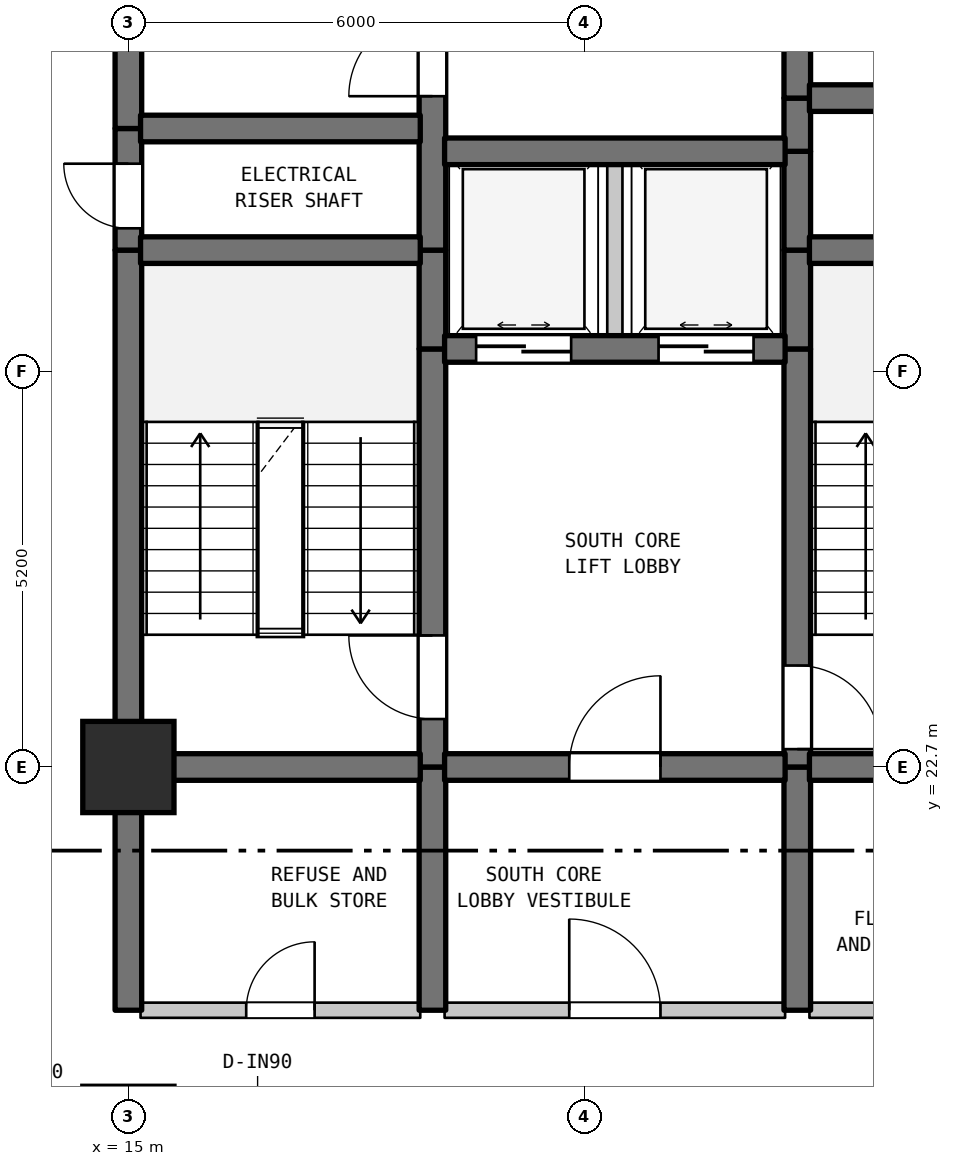
"""IFC4 building model, lengths in metres.
Left out: names, types, materials, properties, quantities, classifications, styles, units other than length and angle.
Written with IfcOpenShell. Run it as: python <this file> out.ifc"""

import sys

from ifc_helpers import new_model, si_unit, direction, frame, frame_2d, origin, origin_2d, place, context, subcontext, project, spatial, rectangle, extrude, element, fill, save


model = new_model("IFC4")
c1 = context("Model", 3, precision=1e-05, world=origin(), true_north=direction((0.0, 1.0)))
c2 = subcontext(c1, "Body", "Model", "MODEL_VIEW")
j1 = project(units=[si_unit("LENGTHUNIT", "METRE"), si_unit("PLANEANGLEUNIT", "RADIAN")], contexts=[c1])
p1 = place(None, origin())
s1 = spatial("IfcSite", under=j1, at=p1, CompositionType="ELEMENT")
p2 = place(p1, origin())
s2 = spatial("IfcBuilding", under=s1, at=p2, CompositionType="ELEMENT")
p3 = place(p2, frame((0.0, 0.0, 53.6)))
s3 = spatial("IfcBuildingStorey", under=s2, at=p3, CompositionType="ELEMENT", Elevation=53.6)
p4 = place(p3, frame((15.0, 22.7, 0.0), z_axis=(0.0, 0.0, 1.0), x_axis=(1.0, 0.0, 0.0)))
e1 = element("IfcColumn", 1, at=p4, inside=s3, PredefinedType="COLUMN", context=c2, shape_type="SweptSolid", body=[
    extrude(rectangle(XDim=1.2, YDim=1.2, at=origin_2d()), origin(), (0.0, 0.0, 1.0), 3.7),
])
p5 = place(p3, frame((15.0, 19.5, 0.0), z_axis=(0.0, 0.0, 1.0), x_axis=(0.0, 1.0, 0.0)))
e2 = element("IfcWall", 2, at=p5, inside=s3, PredefinedType="SHEAR", context=c2, shape_type="SweptSolid", body=[
    extrude(rectangle(XDim=3.2, YDim=0.35, at=frame_2d((1.6, 0.0))), origin(), (0.0, 0.0, 1.0), 3.385),
])
p6 = place(p3, frame((15.0, 22.7, 0.0), z_axis=(0.0, 0.0, 1.0), x_axis=(0.0, 1.0, 0.0)))
e3 = element("IfcWall", 3, at=p6, inside=s3, PredefinedType="SHEAR", context=c2, shape_type="SweptSolid", body=[
    extrude(rectangle(XDim=6.8, YDim=0.35, at=frame_2d((3.4, 0.0))), origin(), (0.0, 0.0, 1.0), 3.385),
])
p7 = place(p3, frame((15.0, 29.5, 0.0), z_axis=(0.0, 0.0, 1.0), x_axis=(0.0, 1.0, 0.0)))
e4 = element("IfcWall", 4, at=p7, inside=s3, PredefinedType="SHEAR", context=c2, shape_type="SweptSolid", body=[
    extrude(rectangle(XDim=1.6, YDim=0.35, at=frame_2d((0.8, 0.0))), origin(), (0.0, 0.0, 1.0), 3.385),
])
p8 = place(p7, frame((0.287, 0.0, 0.0)))
e5 = element("IfcOpeningElement", 5, at=p8, cuts=e4, PredefinedType="OPENING", context=c2, shape_type="SweptSolid", body=[
    extrude(rectangle(XDim=0.85, YDim=2.1, at=frame_2d((0.425, 1.05))), frame((0.0, 0.185, 0.0), z_axis=(0.0, -1.0, 0.0), x_axis=(1.0, 0.0, 0.0)), (0.0, 0.0, 1.0), 0.37),
])
p9 = place(p3, frame((15.0, 31.1, 0.0), z_axis=(0.0, 0.0, 1.0), x_axis=(0.0, 1.0, 0.0)))
e6 = element("IfcWall", 6, at=p9, inside=s3, PredefinedType="SHEAR", context=c2, shape_type="SweptSolid", body=[
    extrude(rectangle(XDim=6.8, YDim=0.35, at=frame_2d((3.4, 0.0))), origin(), (0.0, 0.0, 1.0), 3.385),
])
p10 = place(p3, frame((19.0, 19.5, 0.0), z_axis=(0.0, 0.0, 1.0), x_axis=(0.0, 1.0, 0.0)))
e7 = element("IfcWall", 7, at=p10, inside=s3, PredefinedType="SHEAR", context=c2, shape_type="SweptSolid", body=[
    extrude(rectangle(XDim=3.2, YDim=0.35, at=frame_2d((1.6, 0.0))), origin(), (0.0, 0.0, 1.0), 3.385),
])
p11 = place(p3, frame((19.0, 22.7, 0.0), z_axis=(0.0, 0.0, 1.0), x_axis=(0.0, 1.0, 0.0)))
e8 = element("IfcWall", 8, at=p11, inside=s3, PredefinedType="SHEAR", context=c2, shape_type="SweptSolid", body=[
    extrude(rectangle(XDim=5.5, YDim=0.35, at=frame_2d((2.75, 0.0))), origin(), (0.0, 0.0, 1.0), 3.385),
])
p12 = place(p11, frame((0.631, 0.0, 0.0)))
e9 = element("IfcOpeningElement", 9, at=p12, cuts=e8, PredefinedType="OPENING", context=c2, shape_type="SweptSolid", body=[
    extrude(rectangle(XDim=1.1, YDim=2.15, at=frame_2d((0.55, 1.075))), frame((0.0, 0.185, 0.0), z_axis=(0.0, -1.0, 0.0), x_axis=(1.0, 0.0, 0.0)), (0.0, 0.0, 1.0), 0.37),
])
p13 = place(p3, frame((19.0, 28.2, 0.0), z_axis=(0.0, 0.0, 1.0), x_axis=(0.0, 1.0, 0.0)))
e10 = element("IfcWall", 10, at=p13, inside=s3, PredefinedType="SHEAR", context=c2, shape_type="SweptSolid", body=[
    extrude(rectangle(XDim=1.3, YDim=0.35, at=frame_2d((0.65, 0.0))), origin(), (0.0, 0.0, 1.0), 3.385),
])
p14 = place(p3, frame((19.0, 29.5, 0.0), z_axis=(0.0, 0.0, 1.0), x_axis=(0.0, 1.0, 0.0)))
e11 = element("IfcWall", 11, at=p14, inside=s3, PredefinedType="SHEAR", context=c2, shape_type="SweptSolid", body=[
    extrude(rectangle(XDim=5.5, YDim=0.35, at=frame_2d((2.75, 0.0))), origin(), (0.0, 0.0, 1.0), 3.385),
])
p15 = place(p14, frame((2.025, 0.0, 0.0)))
e12 = element("IfcOpeningElement", 12, at=p15, cuts=e11, PredefinedType="OPENING", context=c2, shape_type="SweptSolid", body=[
    extrude(rectangle(XDim=1.1, YDim=2.15, at=frame_2d((0.55, 1.075))), frame((0.0, 0.185, 0.0), z_axis=(0.0, -1.0, 0.0), x_axis=(1.0, 0.0, 0.0)), (0.0, 0.0, 1.0), 0.37),
])
p16 = place(p3, frame((21.4, 28.2, 0.0), z_axis=(0.0, 0.0, 1.0), x_axis=(0.0, 1.0, 0.0)))
e13 = element("IfcWall", 13, at=p16, inside=s3, PredefinedType="STANDARD", context=c2, shape_type="SweptSolid", body=[
    extrude(rectangle(XDim=2.6, YDim=0.2, at=frame_2d((1.3, 0.0))), origin(), (0.0, 0.0, 1.0), 3.385),
])
p17 = place(p3, frame((23.8, 19.5, 0.0), z_axis=(0.0, 0.0, 1.0), x_axis=(0.0, 1.0, 0.0)))
e14 = element("IfcWall", 14, at=p17, inside=s3, PredefinedType="SHEAR", context=c2, shape_type="SweptSolid", body=[
    extrude(rectangle(XDim=3.2, YDim=0.35, at=frame_2d((1.6, 0.0))), origin(), (0.0, 0.0, 1.0), 3.385),
])
p18 = place(p3, frame((23.8, 22.7, 0.0), z_axis=(0.0, 0.0, 1.0), x_axis=(0.0, 1.0, 0.0)))
e15 = element("IfcWall", 15, at=p18, inside=s3, PredefinedType="SHEAR", context=c2, shape_type="SweptSolid", body=[
    extrude(rectangle(XDim=5.5, YDim=0.35, at=frame_2d((2.75, 0.0))), origin(), (0.0, 0.0, 1.0), 3.385),
])
p19 = place(p18, frame((0.235, 0.0, 0.0)))
e16 = element("IfcOpeningElement", 16, at=p19, cuts=e15, PredefinedType="OPENING", context=c2, shape_type="SweptSolid", body=[
    extrude(rectangle(XDim=1.1, YDim=2.15, at=frame_2d((0.55, 1.075))), frame((0.0, 0.185, 0.0), z_axis=(0.0, -1.0, 0.0), x_axis=(1.0, 0.0, 0.0)), (0.0, 0.0, 1.0), 0.37),
])
for number, where, z_axis, x_axis in (
    (17, (23.8, 28.2, 0.0), (0.0, 0.0, 1.0), (0.0, 1.0, 0.0)),
    (18, (23.8, 29.5, 0.0), (0.0, 0.0, 1.0), (0.0, 1.0, 0.0)),
):
    element("IfcWall", number, at=place(p3, frame(where, z_axis=z_axis, x_axis=x_axis)), inside=s3, PredefinedType="SHEAR", context=c2, shape_type="SweptSolid", body=[
        extrude(rectangle(XDim=1.3, YDim=0.35, at=frame_2d((0.65, 0.0))), origin(), (0.0, 0.0, 1.0), 3.385),
    ])
p20 = place(p3, frame((23.8, 30.8, 0.0), z_axis=(0.0, 0.0, 1.0), x_axis=(0.0, 1.0, 0.0)))
e19 = element("IfcWall", 19, at=p20, inside=s3, PredefinedType="SHEAR", context=c2, shape_type="SweptSolid", body=[
    extrude(rectangle(XDim=0.7, YDim=0.35, at=frame_2d((0.35, 0.0))), origin(), (0.0, 0.0, 1.0), 3.385),
])
p21 = place(p3, frame((23.8, 31.5, 0.0), z_axis=(0.0, 0.0, 1.0), x_axis=(0.0, 1.0, 0.0)))
e20 = element("IfcWall", 20, at=p21, inside=s3, PredefinedType="SHEAR", context=c2, shape_type="SweptSolid", body=[
    extrude(rectangle(XDim=3.5, YDim=0.35, at=frame_2d((1.75, 0.0))), origin(), (0.0, 0.0, 1.0), 3.385),
])
p22 = place(p21, frame((1.127, 0.0, 0.0)))
e21 = element("IfcOpeningElement", 21, at=p22, cuts=e20, PredefinedType="OPENING", context=c2, shape_type="SweptSolid", body=[
    extrude(rectangle(XDim=1.1, YDim=2.15, at=frame_2d((0.55, 1.075))), frame((0.0, 0.185, 0.0), z_axis=(0.0, -1.0, 0.0), x_axis=(1.0, 0.0, 0.0)), (0.0, 0.0, 1.0), 0.37),
])
p23 = place(p3, frame((15.16, 19.5, 0.0), z_axis=(0.0, 0.0, 1.0), x_axis=(1.0, 0.0, 0.0)))
e22 = element("IfcWall", 22, at=p23, inside=s3, PredefinedType="STANDARD", context=c2, shape_type="SweptSolid", body=[
    extrude(rectangle(XDim=3.68, YDim=0.2, at=frame_2d((1.84, 0.0))), origin(), (0.0, 0.0, 1.0), 3.385),
])
p24 = place(p23, frame((1.39, 0.0, 0.0)))
e23 = element("IfcOpeningElement", 23, at=p24, cuts=e22, PredefinedType="OPENING", context=c2, shape_type="SweptSolid", body=[
    extrude(rectangle(XDim=0.9, YDim=2.15, at=frame_2d((0.45, 1.075))), frame((0.0, 0.11, 0.0), z_axis=(0.0, -1.0, 0.0), x_axis=(1.0, 0.0, 0.0)), (0.0, 0.0, 1.0), 0.22),
])
p25 = place(p3, frame((19.16, 19.5, 0.0), z_axis=(0.0, 0.0, 1.0), x_axis=(1.0, 0.0, 0.0)))
e24 = element("IfcWall", 24, at=p25, inside=s3, PredefinedType="STANDARD", context=c2, shape_type="SweptSolid", body=[
    extrude(rectangle(XDim=4.48, YDim=0.2, at=frame_2d((2.24, 0.0))), origin(), (0.0, 0.0, 1.0), 3.385),
])
p26 = place(p25, frame((1.64, 0.0, 0.0)))
e25 = element("IfcOpeningElement", 25, at=p26, cuts=e24, PredefinedType="OPENING", context=c2, shape_type="SweptSolid", body=[
    extrude(rectangle(XDim=1.2, YDim=2.2, at=frame_2d((0.6, 1.1))), frame((0.0, 0.11, 0.0), z_axis=(0.0, -1.0, 0.0), x_axis=(1.0, 0.0, 0.0)), (0.0, 0.0, 1.0), 0.22),
])
p27 = place(p3, frame((23.96, 19.5, 0.0), z_axis=(0.0, 0.0, 1.0), x_axis=(1.0, 0.0, 0.0)))
e26 = element("IfcWall", 26, at=p27, inside=s3, PredefinedType="STANDARD", context=c2, shape_type="SweptSolid", body=[
    extrude(rectangle(XDim=3.155, YDim=0.2, at=frame_2d((1.578, 0.0))), origin(), (0.0, 0.0, 1.0), 3.385),
])
p28 = place(p27, frame((0.991, 0.0, 0.0)))
e27 = element("IfcOpeningElement", 27, at=p28, cuts=e26, PredefinedType="OPENING", context=c2, shape_type="SweptSolid", body=[
    extrude(rectangle(XDim=0.95, YDim=2.15, at=frame_2d((0.475, 1.075))), frame((0.0, 0.11, 0.0), z_axis=(0.0, -1.0, 0.0), x_axis=(1.0, 0.0, 0.0)), (0.0, 0.0, 1.0), 0.22),
])
p29 = place(p3, frame((15.16, 22.7, 0.0), z_axis=(0.0, 0.0, 1.0), x_axis=(1.0, 0.0, 0.0)))
e28 = element("IfcWall", 28, at=p29, inside=s3, PredefinedType="SHEAR", context=c2, shape_type="SweptSolid", body=[
    extrude(rectangle(XDim=3.68, YDim=0.35, at=frame_2d((1.84, 0.0))), origin(), (0.0, 0.0, 1.0), 3.385),
])
p30 = place(p3, frame((19.16, 22.7, 0.0), z_axis=(0.0, 0.0, 1.0), x_axis=(1.0, 0.0, 0.0)))
e29 = element("IfcWall", 29, at=p30, inside=s3, PredefinedType="SHEAR", context=c2, shape_type="SweptSolid", body=[
    extrude(rectangle(XDim=4.48, YDim=0.35, at=frame_2d((2.24, 0.0))), origin(), (0.0, 0.0, 1.0), 3.385),
])
p31 = place(p30, frame((1.64, 0.0, 0.0)))
e30 = element("IfcOpeningElement", 30, at=p31, cuts=e29, PredefinedType="OPENING", context=c2, shape_type="SweptSolid", body=[
    extrude(rectangle(XDim=1.2, YDim=2.2, at=frame_2d((0.6, 1.1))), frame((0.0, 0.185, 0.0), z_axis=(0.0, -1.0, 0.0), x_axis=(1.0, 0.0, 0.0)), (0.0, 0.0, 1.0), 0.37),
])
p32 = place(p3, frame((23.96, 22.7, 0.0), z_axis=(0.0, 0.0, 1.0), x_axis=(1.0, 0.0, 0.0)))
e31 = element("IfcWall", 31, at=p32, inside=s3, PredefinedType="SHEAR", context=c2, shape_type="SweptSolid", body=[
    extrude(rectangle(XDim=3.155, YDim=0.35, at=frame_2d((1.578, 0.0))), origin(), (0.0, 0.0, 1.0), 3.385),
])
p33 = place(p3, frame((19.16, 28.2, 0.0), z_axis=(0.0, 0.0, 1.0), x_axis=(1.0, 0.0, 0.0)))
e32 = element("IfcWall", 32, at=p33, inside=s3, PredefinedType="SHEAR", context=c2, shape_type="SweptSolid", body=[
    extrude(rectangle(XDim=4.48, YDim=0.35, at=frame_2d((2.24, 0.0))), origin(), (0.0, 0.0, 1.0), 3.385),
])
p34 = place(p33, frame((0.415, 0.0, 0.0)))
e33 = element("IfcOpeningElement", 33, at=p34, cuts=e32, PredefinedType="OPENING", context=c2, shape_type="SweptSolid", body=[
    extrude(rectangle(XDim=1.25, YDim=2.2, at=frame_2d((0.625, 1.1))), frame((0.0, 0.185, 0.0), z_axis=(0.0, -1.0, 0.0), x_axis=(1.0, 0.0, 0.0)), (0.0, 0.0, 1.0), 0.37),
])
p35 = place(p33, frame((2.815, 0.0, 0.0)))
e34 = element("IfcOpeningElement", 34, at=p35, cuts=e32, PredefinedType="OPENING", context=c2, shape_type="SweptSolid", body=[
    extrude(rectangle(XDim=1.25, YDim=2.2, at=frame_2d((0.625, 1.1))), frame((0.0, 0.185, 0.0), z_axis=(0.0, -1.0, 0.0), x_axis=(1.0, 0.0, 0.0)), (0.0, 0.0, 1.0), 0.37),
])
p36 = place(p3, frame((15.16, 29.5, 0.0), z_axis=(0.0, 0.0, 1.0), x_axis=(1.0, 0.0, 0.0)))
e35 = element("IfcWall", 35, at=p36, inside=s3, PredefinedType="SHEAR", context=c2, shape_type="SweptSolid", body=[
    extrude(rectangle(XDim=3.68, YDim=0.35, at=frame_2d((1.84, 0.0))), origin(), (0.0, 0.0, 1.0), 3.385),
])
p37 = place(p3, frame((23.96, 29.5, 0.0), z_axis=(0.0, 0.0, 1.0), x_axis=(1.0, 0.0, 0.0)))
e36 = element("IfcWall", 36, at=p37, inside=s3, PredefinedType="SHEAR", context=c2, shape_type="SweptSolid", body=[
    extrude(rectangle(XDim=3.18, YDim=0.35, at=frame_2d((1.59, 0.0))), origin(), (0.0, 0.0, 1.0), 3.385),
])
p38 = place(p3, frame((19.16, 30.8, 0.0), z_axis=(0.0, 0.0, 1.0), x_axis=(1.0, 0.0, 0.0)))
e37 = element("IfcWall", 37, at=p38, inside=s3, PredefinedType="SHEAR", context=c2, shape_type="SweptSolid", body=[
    extrude(rectangle(XDim=4.48, YDim=0.35, at=frame_2d((2.24, 0.0))), origin(), (0.0, 0.0, 1.0), 3.385),
])
p39 = place(p3, frame((15.16, 31.1, 0.0), z_axis=(0.0, 0.0, 1.0), x_axis=(1.0, 0.0, 0.0)))
e38 = element("IfcWall", 38, at=p39, inside=s3, PredefinedType="SHEAR", context=c2, shape_type="SweptSolid", body=[
    extrude(rectangle(XDim=3.68, YDim=0.35, at=frame_2d((1.84, 0.0))), origin(), (0.0, 0.0, 1.0), 3.385),
])
p40 = place(p3, frame((23.96, 31.5, 0.0), z_axis=(0.0, 0.0, 1.0), x_axis=(1.0, 0.0, 0.0)))
e39 = element("IfcWall", 39, at=p40, inside=s3, PredefinedType="SHEAR", context=c2, shape_type="SweptSolid", body=[
    extrude(rectangle(XDim=3.18, YDim=0.35, at=frame_2d((1.59, 0.0))), origin(), (0.0, 0.0, 1.0), 3.385),
])
p41 = place(p40, frame((1.094, 0.0, 0.0)))
e40 = element("IfcOpeningElement", 40, at=p41, cuts=e39, PredefinedType="OPENING", context=c2, shape_type="SweptSolid", body=[
    extrude(rectangle(XDim=0.85, YDim=2.1, at=frame_2d((0.425, 1.05))), frame((0.0, 0.185, 0.0), z_axis=(0.0, -1.0, 0.0), x_axis=(1.0, 0.0, 0.0)), (0.0, 0.0, 1.0), 0.37),
])
p42 = place(p8, origin())
e41 = element("IfcDoor", 41, at=p42, inside=s3, OperationType="SINGLE_SWING_RIGHT", PredefinedType="DOOR", context=c2, shape_type="SweptSolid", body=[
    extrude(rectangle(XDim=0.85, YDim=2.1, at=frame_2d((0.425, 1.05))), frame((0.0, 0.025, 0.0), z_axis=(0.0, -1.0, 0.0), x_axis=(1.0, 0.0, 0.0)), (0.0, 0.0, 1.0), 0.05),
])
fill(e5, e41)
p43 = place(p12, origin())
e42 = element("IfcDoor", 42, at=p43, inside=s3, OperationType="SINGLE_SWING_RIGHT", PredefinedType="DOOR", context=c2, shape_type="SweptSolid", body=[
    extrude(rectangle(XDim=1.1, YDim=2.15, at=frame_2d((0.55, 1.075))), frame((0.0, 0.025, 0.0), z_axis=(0.0, -1.0, 0.0), x_axis=(1.0, 0.0, 0.0)), (0.0, 0.0, 1.0), 0.05),
])
fill(e9, e42)
p44 = place(p15, origin())
e43 = element("IfcDoor", 43, at=p44, inside=s3, OperationType="SINGLE_SWING_LEFT", PredefinedType="DOOR", context=c2, shape_type="SweptSolid", body=[
    extrude(rectangle(XDim=1.1, YDim=2.15, at=frame_2d((0.55, 1.075))), frame((0.0, 0.025, 0.0), z_axis=(0.0, -1.0, 0.0), x_axis=(1.0, 0.0, 0.0)), (0.0, 0.0, 1.0), 0.05),
])
fill(e12, e43)
p45 = place(p19, frame((1.1, 0.0, 0.0), z_axis=(0.0, 0.0, 1.0), x_axis=(-1.0, 0.0, 0.0)))
e44 = element("IfcDoor", 44, at=p45, inside=s3, OperationType="SINGLE_SWING_LEFT", PredefinedType="DOOR", context=c2, shape_type="SweptSolid", body=[
    extrude(rectangle(XDim=1.1, YDim=2.15, at=frame_2d((0.55, 1.075))), frame((0.0, 0.025, 0.0), z_axis=(0.0, -1.0, 0.0), x_axis=(1.0, 0.0, 0.0)), (0.0, 0.0, 1.0), 0.05),
])
fill(e16, e44)
p46 = place(p24, origin())
e45 = element("IfcDoor", 45, at=p46, inside=s3, OperationType="SINGLE_SWING_RIGHT", PredefinedType="DOOR", context=c2, shape_type="SweptSolid", body=[
    extrude(rectangle(XDim=0.9, YDim=2.15, at=frame_2d((0.45, 1.075))), frame((0.0, 0.025, 0.0), z_axis=(0.0, -1.0, 0.0), x_axis=(1.0, 0.0, 0.0)), (0.0, 0.0, 1.0), 0.05),
])
fill(e23, e45)
p47 = place(p26, origin())
e46 = element("IfcDoor", 46, at=p47, inside=s3, OperationType="SINGLE_SWING_LEFT", PredefinedType="DOOR", context=c2, shape_type="SweptSolid", body=[
    extrude(rectangle(XDim=1.2, YDim=2.2, at=frame_2d((0.6, 1.1))), frame((0.0, 0.025, 0.0), z_axis=(0.0, -1.0, 0.0), x_axis=(1.0, 0.0, 0.0)), (0.0, 0.0, 1.0), 0.05),
])
fill(e25, e46)
p48 = place(p31, origin())
e47 = element("IfcDoor", 47, at=p48, inside=s3, OperationType="SINGLE_SWING_RIGHT", PredefinedType="DOOR", context=c2, shape_type="SweptSolid", body=[
    extrude(rectangle(XDim=1.2, YDim=2.2, at=frame_2d((0.6, 1.1))), frame((0.0, 0.025, 0.0), z_axis=(0.0, -1.0, 0.0), x_axis=(1.0, 0.0, 0.0)), (0.0, 0.0, 1.0), 0.05),
])
fill(e30, e47)
p49 = place(p34, origin())
e48 = element("IfcDoor", 48, at=p49, inside=s3, OperationType="DOUBLE_DOOR_SLIDING", PredefinedType="DOOR", context=c2, shape_type="SweptSolid", body=[
    extrude(rectangle(XDim=1.25, YDim=2.2, at=frame_2d((0.625, 1.1))), frame((0.0, 0.025, 0.0), z_axis=(0.0, -1.0, 0.0), x_axis=(1.0, 0.0, 0.0)), (0.0, 0.0, 1.0), 0.05),
])
fill(e33, e48)
p50 = place(p35, origin())
e49 = element("IfcDoor", 49, at=p50, inside=s3, OperationType="DOUBLE_DOOR_SLIDING", PredefinedType="DOOR", context=c2, shape_type="SweptSolid", body=[
    extrude(rectangle(XDim=1.25, YDim=2.2, at=frame_2d((0.625, 1.1))), frame((0.0, 0.025, 0.0), z_axis=(0.0, -1.0, 0.0), x_axis=(1.0, 0.0, 0.0)), (0.0, 0.0, 1.0), 0.05),
])
fill(e34, e49)
save(model, sys.argv[1])
